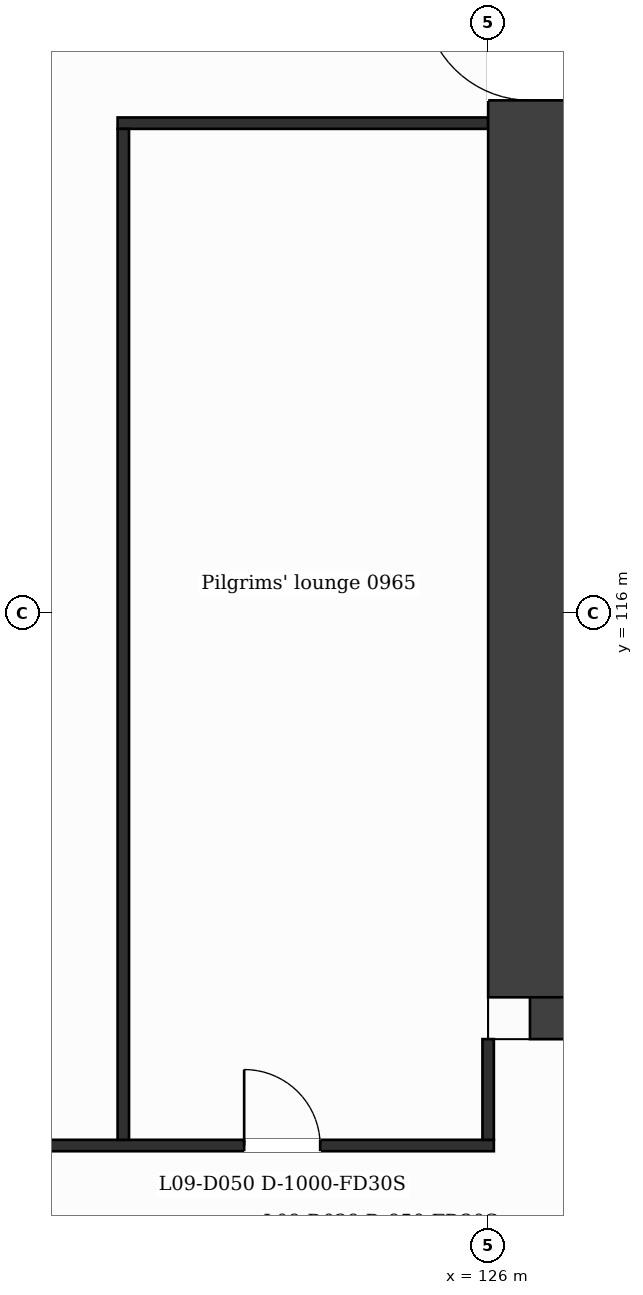
"""IFC4 building model, lengths in metres.
Left out: names, types, materials, properties, quantities, classifications, styles, units other than length and angle.
Written with IfcOpenShell. Run it as: python <this file> out.ifc"""

import sys

from ifc_helpers import new_model, si_unit, direction, frame, frame_2d, origin, place, context, subcontext, project, spatial, rectangle, extrude, element, fill, save


model = new_model("IFC4")
c1 = context("Model", 3, precision=1e-05, world=origin(), true_north=direction((0.0, 1.0)))
c2 = subcontext(c1, "Body", "Model", "MODEL_VIEW")
j1 = project(units=[si_unit("LENGTHUNIT", "METRE"), si_unit("PLANEANGLEUNIT", "RADIAN")], contexts=[c1])
p1 = place(None, origin())
s1 = spatial("IfcSite", under=j1, at=p1, CompositionType="ELEMENT")
p2 = place(p1, origin())
s2 = spatial("IfcBuilding", under=s1, at=p2, CompositionType="ELEMENT")
p3 = place(p2, frame((0.0, 0.0, 49.5)))
s3 = spatial("IfcBuildingStorey", under=s2, at=p3, CompositionType="ELEMENT", Elevation=49.5)
p4 = place(p3, frame((140.502, 110.95, 0.0), z_axis=(0.0, 0.0, 1.0), x_axis=(-1.0, 0.0, 0.0)))
e1 = element("IfcWall", 1, at=p4, inside=s3, PredefinedType="SHEAR", context=c2, shape_type="SweptSolid", body=[
    extrude(rectangle(XDim=13.952, YDim=1.1, at=frame_2d((6.976, 0.0))), origin(), (0.0, 0.0, 1.0), 3.5),
])
p5 = place(p4, frame((6.804, 0.0, 0.0)))
e2 = element("IfcOpeningElement", 2, at=p5, cuts=e1, PredefinedType="OPENING", context=c2, shape_type="SweptSolid", body=[
    extrude(rectangle(XDim=1.4, YDim=2.1, at=frame_2d((0.7, 1.05))), frame((0.0, 0.56, 0.0), z_axis=(0.0, -1.0, 0.0), x_axis=(1.0, 0.0, 0.0)), (0.0, 0.0, 1.0), 1.12),
])
p6 = place(p3, frame((126.55, 110.95, 0.0), z_axis=(0.0, 0.0, 1.0), x_axis=(0.0, 1.0, 0.0)))
e3 = element("IfcWall", 3, at=p6, inside=s3, PredefinedType="SHEAR", context=c2, shape_type="SweptSolid", body=[
    extrude(rectangle(XDim=20.9, YDim=1.1, at=frame_2d((10.45, 0.0))), origin(), (0.0, 0.0, 1.0), 3.5),
])
p7 = place(p6, frame((11.8, 0.0, 0.0)))
e4 = element("IfcOpeningElement", 4, at=p7, cuts=e3, PredefinedType="OPENING", context=c2, shape_type="SweptSolid", body=[
    extrude(rectangle(XDim=1.4, YDim=2.1, at=frame_2d((0.7, 1.05))), frame((0.0, 0.56, 0.0), z_axis=(0.0, -1.0, 0.0), x_axis=(1.0, 0.0, 0.0)), (0.0, 0.0, 1.0), 1.12),
])
p8 = place(p3, frame((100.725, 109.0, 0.0), z_axis=(0.0, 0.0, 1.0), x_axis=(1.0, 0.0, 0.0)))
e5 = element("IfcWall", 5, at=p8, inside=s3, PredefinedType="PARTITIONING", context=c2, shape_type="SweptSolid", body=[
    extrude(rectangle(XDim=25.35, YDim=0.15, at=frame_2d((12.675, 0.0))), origin(), (0.0, 0.0, 1.0), 3.18),
])
p9 = place(p8, frame((1.975, 0.0, 0.0)))
e6 = element("IfcOpeningElement", 6, at=p9, cuts=e5, PredefinedType="OPENING", context=c2, shape_type="SweptSolid", body=[
    extrude(rectangle(XDim=1.0, YDim=2.1, at=frame_2d((0.5, 1.05))), frame((0.0, 0.085, 0.0), z_axis=(0.0, -1.0, 0.0), x_axis=(1.0, 0.0, 0.0)), (0.0, 0.0, 1.0), 0.17),
])
p10 = place(p8, frame((11.505, 0.0, 0.0)))
e7 = element("IfcOpeningElement", 7, at=p10, cuts=e5, PredefinedType="OPENING", context=c2, shape_type="SweptSolid", body=[
    extrude(rectangle(XDim=1.0, YDim=2.1, at=frame_2d((0.5, 1.05))), frame((0.0, 0.085, 0.0), z_axis=(0.0, -1.0, 0.0), x_axis=(1.0, 0.0, 0.0)), (0.0, 0.0, 1.0), 0.17),
])
p11 = place(p8, frame((22.065, 0.0, 0.0)))
e8 = element("IfcOpeningElement", 8, at=p11, cuts=e5, PredefinedType="OPENING", context=c2, shape_type="SweptSolid", body=[
    extrude(rectangle(XDim=1.0, YDim=2.1, at=frame_2d((0.5, 1.05))), frame((0.0, 0.085, 0.0), z_axis=(0.0, -1.0, 0.0), x_axis=(1.0, 0.0, 0.0)), (0.0, 0.0, 1.0), 0.17),
])
p12 = place(p3, frame((121.125, 122.45, 0.0), z_axis=(0.0, 0.0, 1.0), x_axis=(1.0, 0.0, 0.0)))
e9 = element("IfcWall", 9, at=p12, inside=s3, PredefinedType="PARTITIONING", context=c2, shape_type="SweptSolid", body=[
    extrude(rectangle(XDim=4.875, YDim=0.15, at=frame_2d((2.438, 0.0))), origin(), (0.0, 0.0, 1.0), 3.18),
])
p13 = place(p3, frame((121.2, 109.075, 0.0), z_axis=(0.0, 0.0, 1.0), x_axis=(0.0, 1.0, 0.0)))
e10 = element("IfcWall", 10, at=p13, inside=s3, PredefinedType="PARTITIONING", context=c2, shape_type="SweptSolid", body=[
    extrude(rectangle(XDim=13.3, YDim=0.15, at=frame_2d((6.65, 0.0))), origin(), (0.0, 0.0, 1.0), 3.18),
])
p14 = place(p3, frame((126.0, 109.075, 0.0), z_axis=(0.0, 0.0, 1.0), x_axis=(0.0, 1.0, 0.0)))
e11 = element("IfcWall", 11, at=p14, inside=s3, PredefinedType="PARTITIONING", context=c2, shape_type="SweptSolid", body=[
    extrude(rectangle(XDim=1.325, YDim=0.15, at=frame_2d((0.663, 0.0))), origin(), (0.0, 0.0, 1.0), 3.18),
])
p15 = place(p11, origin())
e12 = element("IfcDoor", 12, at=p15, inside=s3, OperationType="SINGLE_SWING_LEFT", PredefinedType="DOOR", context=c2, shape_type="SweptSolid", body=[
    extrude(rectangle(XDim=1.0, YDim=2.1, at=frame_2d((0.5, 1.05))), frame((0.0, 0.025, 0.0), z_axis=(0.0, -1.0, 0.0), x_axis=(1.0, 0.0, 0.0)), (0.0, 0.0, 1.0), 0.05),
])
fill(e8, e12)
p16 = place(p7, origin())
e13 = element("IfcDoor", 13, at=p16, inside=s3, OperationType="SINGLE_SWING_RIGHT", PredefinedType="DOOR", context=c2, shape_type="SweptSolid", body=[
    extrude(rectangle(XDim=1.4, YDim=2.1, at=frame_2d((0.7, 1.05))), frame((0.0, 0.025, 0.0), z_axis=(0.0, -1.0, 0.0), x_axis=(1.0, 0.0, 0.0)), (0.0, 0.0, 1.0), 0.05),
])
fill(e4, e13)
save(model, sys.argv[1])
